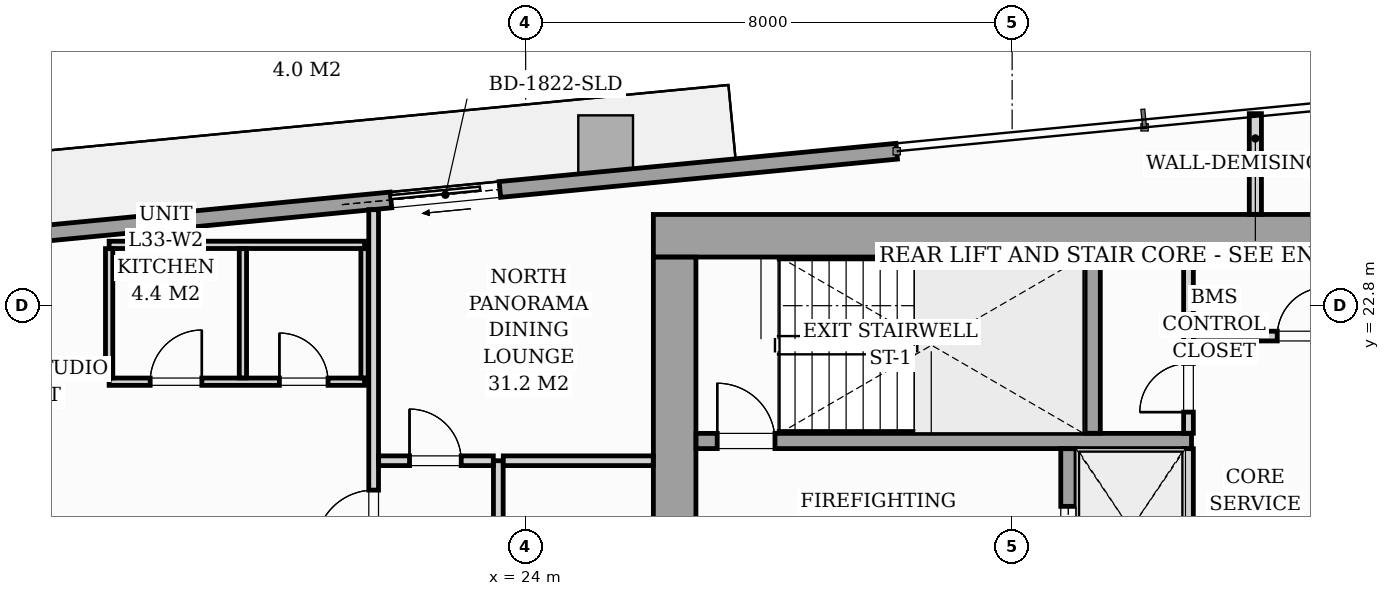
"""IFC4 building model, lengths in metres.
Left out: names, types, materials, properties, quantities, classifications, styles, units other than length and angle.
Written with IfcOpenShell. Run it as: python <this file> out.ifc"""

import sys

from ifc_helpers import new_model, si_unit, direction, frame, frame_2d, origin, origin_2d, place, context, subcontext, project, spatial, rectangle, i_section, extrude, source, transform, mapped, element, fill, save


model = new_model("IFC4")
c1 = context("Model", 3, precision=1e-05, world=origin(), true_north=direction((0.0, 1.0)))
c2 = subcontext(c1, "Body", "Model", "MODEL_VIEW")
j1 = project(units=[si_unit("LENGTHUNIT", "METRE"), si_unit("PLANEANGLEUNIT", "RADIAN")], contexts=[c1])
p1 = place(None, origin())
s1 = spatial("IfcSite", under=j1, at=p1, CompositionType="ELEMENT")
p2 = place(p1, origin())
s2 = spatial("IfcBuilding", under=s1, at=p2, CompositionType="ELEMENT")
p3 = place(p2, frame((0.0, 0.0, 116.2)))
s3 = spatial("IfcBuildingStorey", under=s2, at=p3, CompositionType="ELEMENT", Elevation=116.2)
m1 = source(origin(), c2, "Body", "SweptSolid", [
    extrude(i_section(OverallWidth=0.427, OverallDepth=0.483, WebThickness=0.051, FlangeThickness=0.082, FilletRadius=0.018, at=origin_2d()), origin(), (0.0, 0.0, 1.0), 3.196),
])
for number, where, z_axis, x_axis in (
    (1, (26.4, 24.0, 0.002), (0.0, 0.0, 1.0), (1.0, 0.0, 0.0)),
    (2, (33.12, 24.0, 0.002), (0.0, 0.0, 1.0), (1.0, 0.0, 0.0)),
):
    element("IfcColumn", number, at=place(p3, frame(where, z_axis=z_axis, x_axis=x_axis)), inside=s3, PredefinedType="PILASTER", context=c2, shape_type="MappedRepresentation", body=[
        mapped(m1, transform((0.0, 0.0, 0.0), scale=1.0)),
    ])
m2 = source(origin(), c2, "Body", "SweptSolid", [
    extrude(rectangle(XDim=0.9, YDim=1.1, at=origin_2d()), origin(), (0.0, 0.0, 1.0), 3.194),
])
p4 = place(p3, frame((25.315, 25.38, 0.002), z_axis=(0.0, 0.0, 1.0), x_axis=(0.995396198367, 0.09584575252, 0.0)))
e3 = element("IfcColumn", 3, at=p4, inside=s3, PredefinedType="COLUMN", context=c2, shape_type="MappedRepresentation", body=[
    mapped(m2, transform((0.0, 0.0, 0.0), scale=1.0)),
])
p5 = place(p3, frame((11.08, 23.508, 0.0), z_axis=(0.0, 0.0, 1.0), x_axis=(0.995396638587, 0.095841180552, 0.0)))
e4 = element("IfcWall", 4, at=p5, inside=s3, PredefinedType="STANDARD", context=c2, shape_type="SweptSolid", body=[
    extrude(rectangle(XDim=19.11, YDim=0.26, at=frame_2d((9.555, 0.0))), origin(), (0.0, 0.0, 1.0), 2.9),
])
p6 = place(p5, frame((10.754, 0.0, 0.0)))
e5 = element("IfcOpeningElement", 5, at=p6, cuts=e4, PredefinedType="OPENING", context=c2, shape_type="SweptSolid", body=[
    extrude(rectangle(XDim=1.8, YDim=2.06, at=frame_2d((0.9, 1.03))), frame((0.0, 0.14, 0.0), z_axis=(0.0, -1.0, 0.0), x_axis=(1.0, 0.0, 0.0)), (0.0, 0.0, 1.0), 0.28),
])
p7 = place(p5, frame((2.05, 0.0, 0.65)))
e6 = element("IfcOpeningElement", 6, at=p7, cuts=e4, PredefinedType="OPENING", context=c2, shape_type="SweptSolid", body=[
    extrude(rectangle(XDim=1.6, YDim=1.5, at=frame_2d((0.8, 0.75))), frame((0.0, 0.14, 0.0), z_axis=(0.0, -1.0, 0.0), x_axis=(1.0, 0.0, 0.0)), (0.0, 0.0, 1.0), 0.28),
])
p8 = place(p3, frame((26.1, 23.95, 0.0), z_axis=(0.0, 0.0, 1.0), x_axis=(1.0, 0.0, 0.0)))
e7 = element("IfcWall", 7, at=p8, inside=s3, PredefinedType="SHEAR", context=c2, shape_type="SweptSolid", body=[
    extrude(rectangle(XDim=19.8, YDim=0.7, at=frame_2d((9.9, 0.0))), origin(), (0.0, 0.0, 1.0), 3.2),
])
p9 = place(p3, frame((26.45, 17.802, 0.0), z_axis=(0.0, 0.0, 1.0), x_axis=(0.0, 1.0, 0.0)))
e8 = element("IfcWall", 8, at=p9, inside=s3, PredefinedType="SHEAR", context=c2, shape_type="SweptSolid", body=[
    extrude(rectangle(XDim=5.796, YDim=0.7, at=frame_2d((2.898, 0.0))), origin(), (0.0, 0.0, 1.0), 3.2),
])
p10 = place(p3, frame((26.802, 20.575, 0.0), z_axis=(0.0, 0.0, 1.0), x_axis=(1.0, 0.0, 0.0)))
e9 = element("IfcWall", 9, at=p10, inside=s3, PredefinedType="SOLIDWALL", context=c2, shape_type="SweptSolid", body=[
    extrude(rectangle(XDim=8.148, YDim=0.25, at=frame_2d((4.074, 0.0))), origin(), (0.0, 0.0, 1.0), 3.2),
])
p11 = place(p10, frame((0.348, 0.0, 0.0)))
e10 = element("IfcOpeningElement", 10, at=p11, cuts=e9, PredefinedType="OPENING", context=c2, shape_type="SweptSolid", body=[
    extrude(rectangle(XDim=0.95, YDim=2.06, at=frame_2d((0.475, 1.03))), frame((0.0, 0.135, 0.0), z_axis=(0.0, -1.0, 0.0), x_axis=(1.0, 0.0, 0.0)), (0.0, 0.0, 1.0), 0.27),
])
p12 = place(p3, frame((33.325, 20.702, 0.0), z_axis=(0.0, 0.0, 1.0), x_axis=(0.0, 1.0, 0.0)))
e11 = element("IfcWall", 11, at=p12, inside=s3, PredefinedType="SOLIDWALL", context=c2, shape_type="SweptSolid", body=[
    extrude(rectangle(XDim=2.896, YDim=0.25, at=frame_2d((1.448, 0.0))), origin(), (0.0, 0.0, 1.0), 3.2),
])
p13 = place(p3, frame((32.925, 17.802, 0.0), z_axis=(0.0, 0.0, 1.0), x_axis=(0.0, 1.0, 0.0)))
e12 = element("IfcWall", 12, at=p13, inside=s3, PredefinedType="SOLIDWALL", context=c2, shape_type="SweptSolid", body=[
    extrude(rectangle(XDim=2.646, YDim=0.25, at=frame_2d((1.323, 0.0))), origin(), (0.0, 0.0, 1.0), 3.2),
])
p14 = place(p13, frame((0.598, 0.0, 0.0)))
e13 = element("IfcOpeningElement", 13, at=p14, cuts=e12, PredefinedType="OPENING", context=c2, shape_type="SweptSolid", body=[
    extrude(rectangle(XDim=1.1, YDim=2.08, at=frame_2d((0.55, 1.04))), frame((0.0, 0.135, 0.0), z_axis=(0.0, -1.0, 0.0), x_axis=(1.0, 0.0, 0.0)), (0.0, 0.0, 1.0), 0.27),
])
p15 = place(p3, frame((34.9, 17.802, 0.0), z_axis=(0.0, 0.0, 1.0), x_axis=(0.0, 1.0, 0.0)))
e14 = element("IfcWall", 14, at=p15, inside=s3, PredefinedType="PARTITIONING", context=c2, shape_type="SweptSolid", body=[
    extrude(rectangle(XDim=2.646, YDim=0.16, at=frame_2d((1.323, 0.0))), origin(), (0.0, 0.0, 1.0), 2.9),
])
p16 = place(p3, frame((34.9, 20.702, 0.0), z_axis=(0.0, 0.0, 1.0), x_axis=(0.0, 1.0, 0.0)))
e15 = element("IfcWall", 15, at=p16, inside=s3, PredefinedType="PARTITIONING", context=c2, shape_type="SweptSolid", body=[
    extrude(rectangle(XDim=2.896, YDim=0.16, at=frame_2d((1.448, 0.0))), origin(), (0.0, 0.0, 1.0), 2.9),
])
p17 = place(p16, frame((0.348, 0.0, 0.0)))
e16 = element("IfcOpeningElement", 16, at=p17, cuts=e15, PredefinedType="OPENING", context=c2, shape_type="SweptSolid", body=[
    extrude(rectangle(XDim=0.8, YDim=2.05, at=frame_2d((0.4, 1.025))), frame((0.0, 0.09, 0.0), z_axis=(0.0, -1.0, 0.0), x_axis=(1.0, 0.0, 0.0)), (0.0, 0.0, 1.0), 0.18),
])
p18 = place(p3, frame((34.982, 22.3, 0.0), z_axis=(0.0, 0.0, 1.0), x_axis=(1.0, 0.0, 0.0)))
e17 = element("IfcWall", 17, at=p18, inside=s3, PredefinedType="PARTITIONING", context=c2, shape_type="SweptSolid", body=[
    extrude(rectangle(XDim=3.566, YDim=0.16, at=frame_2d((1.783, 0.0))), origin(), (0.0, 0.0, 1.0), 2.9),
])
p19 = place(p18, frame((1.378, 0.0, 0.0)))
e18 = element("IfcOpeningElement", 18, at=p19, cuts=e17, PredefinedType="OPENING", context=c2, shape_type="SweptSolid", body=[
    extrude(rectangle(XDim=0.8, YDim=2.05, at=frame_2d((0.4, 1.025))), frame((0.0, 0.09, 0.0), z_axis=(0.0, -1.0, 0.0), x_axis=(1.0, 0.0, 0.0)), (0.0, 0.0, 1.0), 0.18),
])
p20 = place(p3, frame((21.5, 12.732, 0.0), z_axis=(0.0, 0.0, 1.0), x_axis=(0.0, 1.0, 0.0)))
e19 = element("IfcWall", 19, at=p20, inside=s3, PredefinedType="PARTITIONING", context=c2, shape_type="SweptSolid", body=[
    extrude(rectangle(XDim=11.647, YDim=0.16, at=frame_2d((5.823, 0.0))), origin(), (0.0, 0.0, 1.0), 2.9),
])
p21 = place(p20, frame((0.493, 0.0, 0.0)))
e20 = element("IfcOpeningElement", 20, at=p21, cuts=e19, PredefinedType="OPENING", context=c2, shape_type="SweptSolid", body=[
    extrude(rectangle(XDim=0.95, YDim=2.06, at=frame_2d((0.475, 1.03))), frame((0.0, 0.09, 0.0), z_axis=(0.0, -1.0, 0.0), x_axis=(1.0, 0.0, 0.0)), (0.0, 0.0, 1.0), 0.18),
])
p22 = place(p20, frame((6.085, 0.0, 0.0)))
e21 = element("IfcOpeningElement", 21, at=p22, cuts=e19, PredefinedType="OPENING", context=c2, shape_type="SweptSolid", body=[
    extrude(rectangle(XDim=0.95, YDim=2.06, at=frame_2d((0.475, 1.03))), frame((0.0, 0.09, 0.0), z_axis=(0.0, -1.0, 0.0), x_axis=(1.0, 0.0, 0.0)), (0.0, 0.0, 1.0), 0.18),
])
p23 = place(p3, frame((36.0, 24.302, 0.0), z_axis=(0.0, 0.0, 1.0), x_axis=(0.0, 1.0, 0.0)))
e22 = element("IfcWall", 22, at=p23, inside=s3, PredefinedType="PARTITIONING", context=c2, shape_type="SweptSolid", body=[
    extrude(rectangle(XDim=1.656, YDim=0.2, at=frame_2d((0.828, 0.0))), origin(), (0.0, 0.0, 1.0), 2.9),
])
p24 = place(p3, frame((17.15, 21.55, 0.0), z_axis=(0.0, 0.0, 1.0), x_axis=(1.0, 0.0, 0.0)))
e23 = element("IfcWall", 23, at=p24, inside=s3, PredefinedType="PARTITIONING", context=c2, shape_type="SweptSolid", body=[
    extrude(rectangle(XDim=4.2, YDim=0.12, at=frame_2d((2.1, 0.0))), origin(), (0.0, 0.0, 1.0), 2.9),
])
p25 = place(p24, frame((0.675, 0.0, 0.0)))
e24 = element("IfcOpeningElement", 24, at=p25, cuts=e23, PredefinedType="OPENING", context=c2, shape_type="SweptSolid", body=[
    extrude(rectangle(XDim=0.85, YDim=2.05, at=frame_2d((0.425, 1.025))), frame((0.0, 0.07, 0.0), z_axis=(0.0, -1.0, 0.0), x_axis=(1.0, 0.0, 0.0)), (0.0, 0.0, 1.0), 0.14),
])
p26 = place(p24, frame((2.8, 0.0, 0.0)))
e25 = element("IfcOpeningElement", 25, at=p26, cuts=e23, PredefinedType="OPENING", context=c2, shape_type="SweptSolid", body=[
    extrude(rectangle(XDim=0.8, YDim=2.02, at=frame_2d((0.4, 1.01))), frame((0.0, 0.07, 0.0), z_axis=(0.0, -1.0, 0.0), x_axis=(1.0, 0.0, 0.0)), (0.0, 0.0, 1.0), 0.14),
])
p27 = place(p3, frame((17.15, 23.8, 0.0), z_axis=(0.0, 0.0, 1.0), x_axis=(1.0, 0.0, 0.0)))
e26 = element("IfcWall", 26, at=p27, inside=s3, PredefinedType="PARTITIONING", context=c2, shape_type="SweptSolid", body=[
    extrude(rectangle(XDim=4.2, YDim=0.12, at=frame_2d((2.1, 0.0))), origin(), (0.0, 0.0, 1.0), 2.27),
])
for number, where, z_axis, x_axis in (
    (27, (17.15, 21.612, 0.0), (0.0, 0.0, 1.0), (0.0, 1.0, 0.0)),
    (28, (19.35, 21.612, 0.0), (0.0, 0.0, 1.0), (0.0, 1.0, 0.0)),
    (29, (21.35, 21.612, 0.0), (0.0, 0.0, 1.0), (0.0, 1.0, 0.0)),
):
    element("IfcWall", number, at=place(p3, frame(where, z_axis=z_axis, x_axis=x_axis)), inside=s3, PredefinedType="PARTITIONING", context=c2, shape_type="SweptSolid", body=[
        extrude(rectangle(XDim=2.126, YDim=0.12, at=frame_2d((1.063, 0.0))), origin(), (0.0, 0.0, 1.0), 2.9),
    ])
p28 = place(p3, frame((23.55, 14.66, 0.0), z_axis=(0.0, 0.0, 1.0), x_axis=(0.0, 1.0, 0.0)))
e30 = element("IfcWall", 30, at=p28, inside=s3, PredefinedType="PARTITIONING", context=c2, shape_type="SweptSolid", body=[
    extrude(rectangle(XDim=5.59, YDim=0.16, at=frame_2d((2.795, 0.0))), origin(), (0.0, 0.0, 1.0), 2.9),
])
p29 = place(p28, frame((2.36, 0.0, 0.0)))
e31 = element("IfcOpeningElement", 31, at=p29, cuts=e30, PredefinedType="OPENING", context=c2, shape_type="SweptSolid", body=[
    extrude(rectangle(XDim=0.95, YDim=2.06, at=frame_2d((0.475, 1.03))), frame((0.0, 0.09, 0.0), z_axis=(0.0, -1.0, 0.0), x_axis=(1.0, 0.0, 0.0)), (0.0, 0.0, 1.0), 0.18),
])
p30 = place(p3, frame((21.582, 20.25, 0.0), z_axis=(0.0, 0.0, 1.0), x_axis=(1.0, 0.0, 0.0)))
e32 = element("IfcWall", 32, at=p30, inside=s3, PredefinedType="PARTITIONING", context=c2, shape_type="SweptSolid", body=[
    extrude(rectangle(XDim=1.886, YDim=0.16, at=frame_2d((0.943, 0.0))), origin(), (0.0, 0.0, 1.0), 2.9),
])
p31 = place(p30, frame((0.508, 0.0, 0.0)))
e33 = element("IfcOpeningElement", 33, at=p31, cuts=e32, PredefinedType="OPENING", context=c2, shape_type="SweptSolid", body=[
    extrude(rectangle(XDim=0.85, YDim=2.0, at=frame_2d((0.425, 1.0))), frame((0.0, 0.09, 0.0), z_axis=(0.0, -1.0, 0.0), x_axis=(1.0, 0.0, 0.0)), (0.0, 0.0, 1.0), 0.18),
])
p32 = place(p3, frame((23.632, 20.25, 0.0), z_axis=(0.0, 0.0, 1.0), x_axis=(1.0, 0.0, 0.0)))
e34 = element("IfcWall", 34, at=p32, inside=s3, PredefinedType="PARTITIONING", context=c2, shape_type="SweptSolid", body=[
    extrude(rectangle(XDim=2.466, YDim=0.16, at=frame_2d((1.233, 0.0))), origin(), (0.0, 0.0, 1.0), 2.9),
])
m3 = source(origin(), c2, "Body", "SweptSolid", [
    extrude(rectangle(XDim=1.8, YDim=2.06, at=frame_2d((0.9, 1.03))), frame((0.0, 0.025, 0.0), z_axis=(0.0, -1.0, 0.0), x_axis=(1.0, 0.0, 0.0)), (0.0, 0.0, 1.0), 0.05),
])
p33 = place(p6, origin())
e35 = element("IfcDoor", 35, at=p33, inside=s3, OperationType="SLIDING_TO_LEFT", PredefinedType="DOOR", context=c2, shape_type="MappedRepresentation", body=[
    mapped(m3, transform((0.0, 0.0, 0.0), scale=1.0)),
])
fill(e5, e35)
m4 = source(origin(), c2, "Body", "SweptSolid", [
    extrude(rectangle(XDim=0.95, YDim=2.06, at=frame_2d((0.475, 1.03))), frame((0.0, 0.025, 0.0), z_axis=(0.0, -1.0, 0.0), x_axis=(1.0, 0.0, 0.0)), (0.0, 0.0, 1.0), 0.05),
])
p34 = place(p11, origin())
e36 = element("IfcDoor", 36, at=p34, inside=s3, OperationType="SINGLE_SWING_LEFT", PredefinedType="DOOR", context=c2, shape_type="MappedRepresentation", body=[
    mapped(m4, transform((0.0, 0.0, 0.0), scale=1.0)),
])
fill(e10, e36)
m5 = source(origin(), c2, "Body", "SweptSolid", [
    extrude(rectangle(XDim=1.1, YDim=2.08, at=frame_2d((0.55, 1.04))), frame((0.0, 0.025, 0.0), z_axis=(0.0, -1.0, 0.0), x_axis=(1.0, 0.0, 0.0)), (0.0, 0.0, 1.0), 0.05),
])
p35 = place(p14, origin())
e37 = element("IfcDoor", 37, at=p35, inside=s3, OperationType="SLIDING_TO_LEFT", PredefinedType="DOOR", context=c2, shape_type="MappedRepresentation", body=[
    mapped(m5, transform((0.0, 0.0, 0.0), scale=1.0)),
])
fill(e13, e37)
m6 = source(origin(), c2, "Body", "SweptSolid", [
    extrude(rectangle(XDim=0.8, YDim=2.05, at=frame_2d((0.4, 1.025))), frame((0.0, 0.025, 0.0), z_axis=(0.0, -1.0, 0.0), x_axis=(1.0, 0.0, 0.0)), (0.0, 0.0, 1.0), 0.05),
])
p36 = place(p17, origin())
e38 = element("IfcDoor", 38, at=p36, inside=s3, OperationType="SINGLE_SWING_LEFT", PredefinedType="DOOR", context=c2, shape_type="MappedRepresentation", body=[
    mapped(m6, transform((0.0, 0.0, 0.0), scale=1.0)),
])
fill(e16, e38)
p37 = place(p19, origin())
e39 = element("IfcDoor", 39, at=p37, inside=s3, OperationType="SINGLE_SWING_RIGHT", PredefinedType="DOOR", context=c2, shape_type="MappedRepresentation", body=[
    mapped(m6, transform((0.0, 0.0, 0.0), scale=1.0)),
])
fill(e18, e39)
m7 = source(origin(), c2, "Body", "SweptSolid", [
    extrude(rectangle(XDim=0.95, YDim=2.06, at=frame_2d((0.475, 1.03))), frame((0.0, 0.025, 0.0), z_axis=(0.0, -1.0, 0.0), x_axis=(1.0, 0.0, 0.0)), (0.0, 0.0, 1.0), 0.05),
])
p38 = place(p22, origin())
e40 = element("IfcDoor", 40, at=p38, inside=s3, OperationType="SINGLE_SWING_LEFT", PredefinedType="DOOR", context=c2, shape_type="MappedRepresentation", body=[
    mapped(m7, transform((0.0, 0.0, 0.0), scale=1.0)),
])
fill(e21, e40)
m8 = source(origin(), c2, "Body", "SweptSolid", [
    extrude(rectangle(XDim=0.85, YDim=2.05, at=frame_2d((0.425, 1.025))), frame((0.0, 0.025, 0.0), z_axis=(0.0, -1.0, 0.0), x_axis=(1.0, 0.0, 0.0)), (0.0, 0.0, 1.0), 0.05),
])
p39 = place(p25, origin())
e41 = element("IfcDoor", 41, at=p39, inside=s3, OperationType="SINGLE_SWING_RIGHT", PredefinedType="DOOR", context=c2, shape_type="MappedRepresentation", body=[
    mapped(m8, transform((0.0, 0.0, 0.0), scale=1.0)),
])
fill(e24, e41)
m9 = source(origin(), c2, "Body", "SweptSolid", [
    extrude(rectangle(XDim=0.8, YDim=2.02, at=frame_2d((0.4, 1.01))), frame((0.0, 0.025, 0.0), z_axis=(0.0, -1.0, 0.0), x_axis=(1.0, 0.0, 0.0)), (0.0, 0.0, 1.0), 0.05),
])
p40 = place(p26, origin())
e42 = element("IfcDoor", 42, at=p40, inside=s3, OperationType="SINGLE_SWING_LEFT", PredefinedType="DOOR", context=c2, shape_type="MappedRepresentation", body=[
    mapped(m9, transform((0.0, 0.0, 0.0), scale=1.0)),
])
fill(e25, e42)
m10 = source(origin(), c2, "Body", "SweptSolid", [
    extrude(rectangle(XDim=0.85, YDim=2.0, at=frame_2d((0.425, 1.0))), frame((0.0, 0.025, 0.0), z_axis=(0.0, -1.0, 0.0), x_axis=(1.0, 0.0, 0.0)), (0.0, 0.0, 1.0), 0.05),
])
p41 = place(p31, origin())
e43 = element("IfcDoor", 43, at=p41, inside=s3, OperationType="SINGLE_SWING_LEFT", PredefinedType="DOOR", context=c2, shape_type="MappedRepresentation", body=[
    mapped(m10, transform((0.0, 0.0, 0.0), scale=1.0)),
])
fill(e33, e43)
save(model, sys.argv[1])
